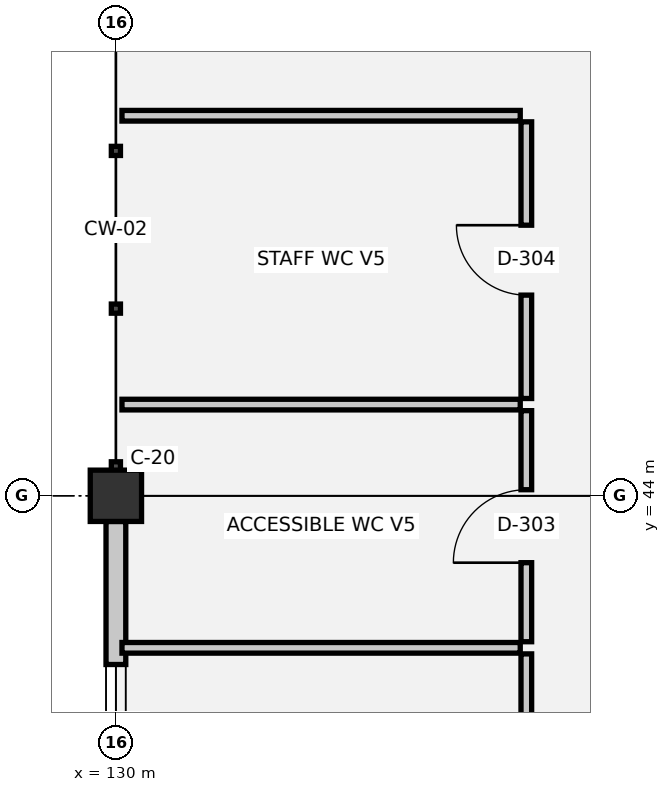
"""IFC4 building model, lengths in metres.
Left out: names, types, materials, properties, quantities, classifications, styles, units other than length and angle.
Written with IfcOpenShell. Run it as: python <this file> out.ifc"""

import sys

from ifc_helpers import new_model, si_unit, direction, frame, frame_2d, origin, origin_2d, place, context, subcontext, project, spatial, rectangle, extrude, element, fill, save


model = new_model("IFC4")
c1 = context("Model", 3, precision=1e-05, world=origin(), true_north=direction((0.0, 1.0)))
c2 = subcontext(c1, "Body", "Model", "MODEL_VIEW")
j1 = project(units=[si_unit("LENGTHUNIT", "METRE"), si_unit("PLANEANGLEUNIT", "RADIAN")], contexts=[c1])
p1 = place(None, origin())
s1 = spatial("IfcSite", under=j1, at=p1, CompositionType="ELEMENT")
p2 = place(p1, origin())
s2 = spatial("IfcBuilding", under=s1, at=p2, CompositionType="ELEMENT")
p3 = place(p2, frame((0.0, 0.0, 9.9)))
s3 = spatial("IfcBuildingStorey", under=s2, at=p3, CompositionType="ELEMENT", Elevation=9.9)
p4 = place(p3, frame((130.0, 44.0, 0.0), z_axis=(0.0, 0.0, 1.0), x_axis=(1.0, 0.0, 0.0)))
e1 = element("IfcColumn", 1, at=p4, inside=s3, PredefinedType="COLUMN", context=c2, shape_type="SweptSolid", body=[
    extrude(rectangle(XDim=0.675, YDim=0.675, at=origin_2d()), origin(), (0.0, 0.0, 1.0), 4.5),
])
p5 = place(p3, frame((130.0, 38.337, 0.0), z_axis=(0.0, 0.0, 1.0), x_axis=(0.0, 1.0, 0.0)))
e2 = element("IfcWall", 2, at=p5, inside=s3, PredefinedType="SOLIDWALL", context=c2, shape_type="SweptSolid", body=[
    extrude(rectangle(XDim=5.325, YDim=0.26, at=frame_2d((2.663, 0.0))), origin(), (0.0, 0.0, 1.0), 3.23),
])
p6 = place(p5, frame((1.243, 0.0, 1.0)))
e3 = element("IfcOpeningElement", 3, at=p6, cuts=e2, PredefinedType="OPENING", context=c2, shape_type="SweptSolid", body=[
    extrude(rectangle(XDim=2.2, YDim=1.0, at=frame_2d((1.1, 0.5))), frame((0.0, 0.14, 0.0), z_axis=(0.0, -1.0, 0.0), x_axis=(1.0, 0.0, 0.0)), (0.0, 0.0, 1.0), 0.28),
])
for number, where, z_axis, x_axis in (
    (4, (130.08, 42.0, 0.0), (0.0, 0.0, 1.0), (1.0, 0.0, 0.0)),
    (5, (130.08, 45.2, 0.0), (0.0, 0.0, 1.0), (1.0, 0.0, 0.0)),
    (6, (130.08, 49.0, 0.0), (0.0, 0.0, 1.0), (1.0, 0.0, 0.0)),
):
    element("IfcWall", number, at=place(p3, frame(where, z_axis=z_axis, x_axis=x_axis)), inside=s3, PredefinedType="PLUMBINGWALL", context=c2, shape_type="SweptSolid", body=[
        extrude(rectangle(XDim=5.24, YDim=0.14, at=frame_2d((2.62, 0.0))), origin(), (0.0, 0.0, 1.0), 4.14),
    ])
p7 = place(p3, frame((135.4, 38.08, 0.0), z_axis=(0.0, 0.0, 1.0), x_axis=(0.0, 1.0, 0.0)))
e7 = element("IfcWall", 7, at=p7, inside=s3, PredefinedType="PLUMBINGWALL", context=c2, shape_type="SweptSolid", body=[
    extrude(rectangle(XDim=3.84, YDim=0.14, at=frame_2d((1.92, 0.0))), origin(), (0.0, 0.0, 1.0), 4.14),
])
p8 = place(p7, frame((1.46, 0.0, 0.0)))
e8 = element("IfcOpeningElement", 8, at=p8, cuts=e7, PredefinedType="OPENING", context=c2, shape_type="SweptSolid", body=[
    extrude(rectangle(XDim=0.92, YDim=2.1, at=frame_2d((0.46, 1.05))), frame((0.0, 0.08, 0.0), z_axis=(0.0, -1.0, 0.0), x_axis=(1.0, 0.0, 0.0)), (0.0, 0.0, 1.0), 0.16),
])
p9 = place(p3, frame((135.4, 42.08, 0.0), z_axis=(0.0, 0.0, 1.0), x_axis=(0.0, 1.0, 0.0)))
e9 = element("IfcWall", 9, at=p9, inside=s3, PredefinedType="PLUMBINGWALL", context=c2, shape_type="SweptSolid", body=[
    extrude(rectangle(XDim=3.04, YDim=0.14, at=frame_2d((1.52, 0.0))), origin(), (0.0, 0.0, 1.0), 4.14),
])
p10 = place(p9, frame((1.04, 0.0, 0.0)))
e10 = element("IfcOpeningElement", 10, at=p10, cuts=e9, PredefinedType="OPENING", context=c2, shape_type="SweptSolid", body=[
    extrude(rectangle(XDim=0.96, YDim=2.1, at=frame_2d((0.48, 1.05))), frame((0.0, 0.08, 0.0), z_axis=(0.0, -1.0, 0.0), x_axis=(1.0, 0.0, 0.0)), (0.0, 0.0, 1.0), 0.16),
])
p11 = place(p3, frame((135.4, 45.28, 0.0), z_axis=(0.0, 0.0, 1.0), x_axis=(0.0, 1.0, 0.0)))
e11 = element("IfcWall", 11, at=p11, inside=s3, PredefinedType="PLUMBINGWALL", context=c2, shape_type="SweptSolid", body=[
    extrude(rectangle(XDim=3.64, YDim=0.14, at=frame_2d((1.82, 0.0))), origin(), (0.0, 0.0, 1.0), 4.14),
])
p12 = place(p11, frame((1.36, 0.0, 0.0)))
e12 = element("IfcOpeningElement", 12, at=p12, cuts=e11, PredefinedType="OPENING", context=c2, shape_type="SweptSolid", body=[
    extrude(rectangle(XDim=0.92, YDim=2.1, at=frame_2d((0.46, 1.05))), frame((0.0, 0.08, 0.0), z_axis=(0.0, -1.0, 0.0), x_axis=(1.0, 0.0, 0.0)), (0.0, 0.0, 1.0), 0.16),
])
p13 = place(p6, origin())
e13 = element("IfcWindow", 13, at=p13, inside=s3, PartitioningType="SINGLE_PANEL", PredefinedType="WINDOW", context=c2, shape_type="SweptSolid", body=[
    extrude(rectangle(XDim=2.2, YDim=1.0, at=frame_2d((1.1, 0.5))), frame((0.0, 0.03, 0.0), z_axis=(0.0, -1.0, 0.0), x_axis=(1.0, 0.0, 0.0)), (0.0, 0.0, 1.0), 0.06),
])
fill(e3, e13)
p14 = place(p10, origin())
e14 = element("IfcDoor", 14, at=p14, inside=s3, OperationType="SINGLE_SWING_LEFT", PredefinedType="DOOR", context=c2, shape_type="SweptSolid", body=[
    extrude(rectangle(XDim=0.96, YDim=2.1, at=frame_2d((0.48, 1.05))), frame((0.0, 0.025, 0.0), z_axis=(0.0, -1.0, 0.0), x_axis=(1.0, 0.0, 0.0)), (0.0, 0.0, 1.0), 0.05),
])
fill(e10, e14)
p15 = place(p12, origin())
e15 = element("IfcDoor", 15, at=p15, inside=s3, OperationType="SINGLE_SWING_RIGHT", PredefinedType="DOOR", context=c2, shape_type="SweptSolid", body=[
    extrude(rectangle(XDim=0.92, YDim=2.1, at=frame_2d((0.46, 1.05))), frame((0.0, 0.025, 0.0), z_axis=(0.0, -1.0, 0.0), x_axis=(1.0, 0.0, 0.0)), (0.0, 0.0, 1.0), 0.05),
])
fill(e12, e15)
save(model, sys.argv[1])
